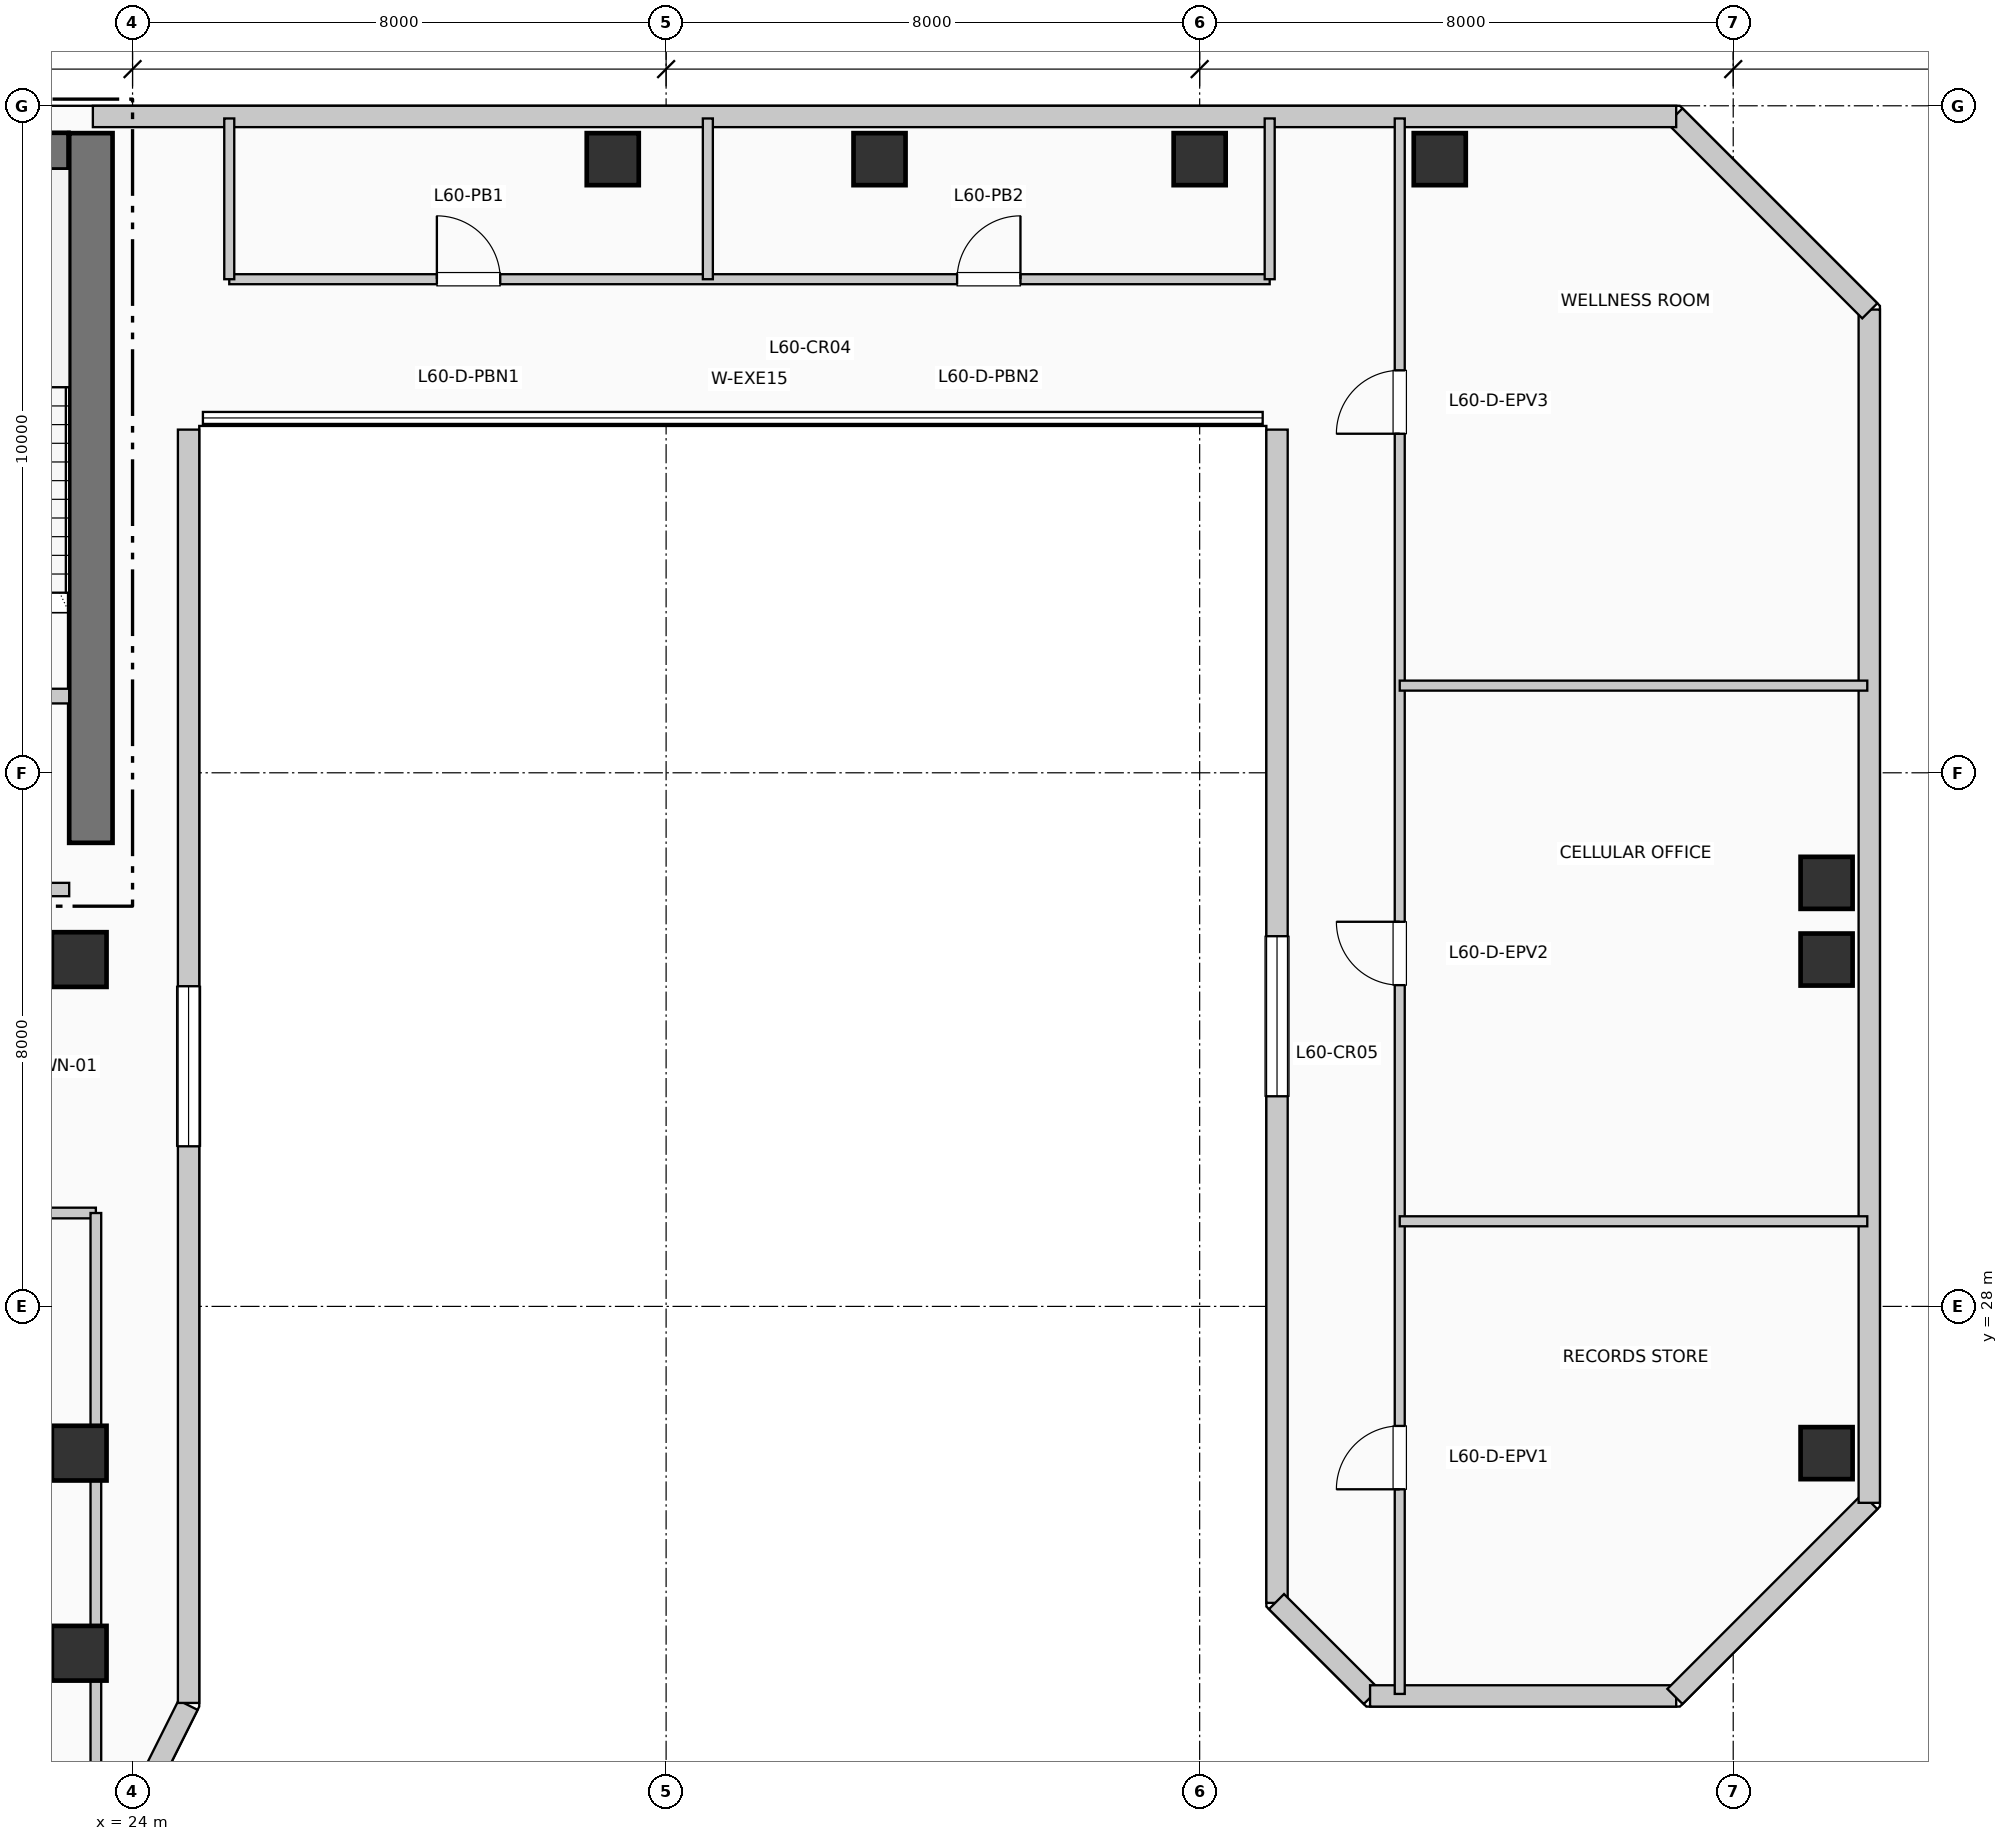
"""IFC4 building model, lengths in metres.
Left out: names, types, materials, properties, quantities, classifications, styles, units other than length and angle.
Written with IfcOpenShell. Run it as: python <this file> out.ifc"""

import sys

from ifc_helpers import new_model, si_unit, direction, frame, frame_2d, origin, origin_2d, place, context, subcontext, project, spatial, rectangle, extrude, element, fill, save


model = new_model("IFC4")
c1 = context("Model", 3, precision=1e-05, world=origin(), true_north=direction((0.0, 1.0)))
c2 = subcontext(c1, "Body", "Model", "MODEL_VIEW")
j1 = project(units=[si_unit("LENGTHUNIT", "METRE"), si_unit("PLANEANGLEUNIT", "RADIAN")], contexts=[c1])
p1 = place(None, origin())
s1 = spatial("IfcSite", under=j1, at=p1, CompositionType="ELEMENT")
p2 = place(p1, origin())
s2 = spatial("IfcBuilding", under=s1, at=p2, CompositionType="ELEMENT")
p3 = place(p2, frame((0.0, 0.0, 247.5)))
s3 = spatial("IfcBuildingStorey", under=s2, at=p3, CompositionType="ELEMENT", Elevation=247.5)
p4 = place(p3, frame((23.375, 34.95, 0.0), z_axis=(0.0, 0.0, 1.0), x_axis=(0.0, 1.0, 0.0)))
e1 = element("IfcWall", 1, at=p4, inside=s3, PredefinedType="SHEAR", context=c2, shape_type="SweptSolid", body=[
    extrude(rectangle(XDim=10.64, YDim=0.65, at=frame_2d((5.32, 0.0))), origin(), (0.0, 0.0, 1.0), 3.96),
])
p5 = place(p3, frame((19.35, 45.32, 0.0), z_axis=(0.0, 0.0, 1.0), x_axis=(1.0, 0.0, 0.0)))
e2 = element("IfcWall", 2, at=p5, inside=s3, PredefinedType="SHEAR", context=c2, shape_type="SweptSolid", body=[
    extrude(rectangle(XDim=3.69, YDim=0.55, at=frame_2d((1.845, 0.0))), origin(), (0.0, 0.0, 1.0), 3.96),
])
p6 = place(p5, frame((1.15, 0.0, 1.05)))
e3 = element("IfcOpeningElement", 3, at=p6, cuts=e2, PredefinedType="OPENING", context=c2, shape_type="SweptSolid", body=[
    extrude(rectangle(XDim=1.4, YDim=1.8, at=frame_2d((0.7, 0.9))), frame((0.0, 0.285, 0.0), z_axis=(0.0, -1.0, 0.0), x_axis=(1.0, 0.0, 0.0)), (0.0, 0.0, 1.0), 0.57),
])
for number, where, z_axis, x_axis in (
    (4, (23.2, 22.8, 0.0), (0.0, 0.0, 1.0), (1.0, 0.0, 0.0)),
    (5, (23.2, 25.8, 0.0), (0.0, 0.0, 1.0), (1.0, 0.0, 0.0)),
    (6, (23.2, 33.2, 0.0), (0.0, 0.0, 1.0), (1.0, 0.0, 0.0)),
):
    element("IfcColumn", number, at=place(p3, frame(where, z_axis=z_axis, x_axis=x_axis)), inside=s3, PredefinedType="COLUMN", context=c2, shape_type="SweptSolid", body=[
        extrude(rectangle(XDim=0.82, YDim=0.82, at=origin_2d()), origin(), (0.0, 0.0, 1.0), 3.96),
    ])
for number, where, z_axis, x_axis in (
    (7, (31.2, 45.2, 0.0), (0.0, 0.0, 1.0), (1.0, 0.0, 0.0)),
    (8, (35.2, 45.2, 0.0), (0.0, 0.0, 1.0), (1.0, 0.0, 0.0)),
    (9, (40.0, 45.2, 0.0), (0.0, 0.0, 1.0), (1.0, 0.0, 0.0)),
    (10, (43.6, 45.2, 0.0), (0.0, 0.0, 1.0), (1.0, 0.0, 0.0)),
    (11, (49.4, 25.8, 0.0), (0.0, 0.0, 1.0), (1.0, 0.0, 0.0)),
    (12, (49.4, 33.2, 0.0), (0.0, 0.0, 1.0), (1.0, 0.0, 0.0)),
    (13, (49.4, 34.35, 0.0), (0.0, 0.0, 1.0), (1.0, 0.0, 0.0)),
):
    element("IfcColumn", number, at=place(p3, frame(where, z_axis=z_axis, x_axis=x_axis)), inside=s3, PredefinedType="COLUMN", context=c2, shape_type="SweptSolid", body=[
        extrude(rectangle(XDim=0.78, YDim=0.78, at=origin_2d()), origin(), (0.0, 0.0, 1.0), 3.96),
    ])
p7 = place(p3, frame((23.882, 20.121, 0.0), z_axis=(0.0, 0.0, 1.0), x_axis=(0.447121734542, 0.894473115583, 0.0)))
e14 = element("IfcWall", 14, at=p7, inside=s3, PredefinedType="SOLIDWALL", context=c2, shape_type="SweptSolid", body=[
    extrude(rectangle(XDim=2.126, YDim=0.32, at=frame_2d((1.063, 0.0))), origin(), (0.0, 0.0, 1.0), 3.54),
])
p8 = place(p3, frame((24.84, 22.055, 0.0), z_axis=(0.0, 0.0, 1.0), x_axis=(0.0, 1.0, 0.0)))
e15 = element("IfcWall", 15, at=p8, inside=s3, PredefinedType="SOLIDWALL", context=c2, shape_type="SweptSolid", body=[
    extrude(rectangle(XDim=19.09, YDim=0.32, at=frame_2d((9.545, 0.0))), origin(), (0.0, 0.0, 1.0), 3.54),
])
p9 = place(p8, frame((8.345, 0.0, 0.85)))
e16 = element("IfcOpeningElement", 16, at=p9, cuts=e15, PredefinedType="OPENING", context=c2, shape_type="SweptSolid", body=[
    extrude(rectangle(XDim=2.4, YDim=2.05, at=frame_2d((1.2, 1.025))), frame((0.0, 0.17, 0.0), z_axis=(0.0, -1.0, 0.0), x_axis=(1.0, 0.0, 0.0)), (0.0, 0.0, 1.0), 0.34),
])
p10 = place(p3, frame((41.16, 41.145, 0.0), z_axis=(0.0, 0.0, 1.0), x_axis=(0.0, -1.0, 0.0)))
e17 = element("IfcWall", 17, at=p10, inside=s3, PredefinedType="SOLIDWALL", context=c2, shape_type="SweptSolid", body=[
    extrude(rectangle(XDim=17.59, YDim=0.32, at=frame_2d((8.795, 0.0))), origin(), (0.0, 0.0, 1.0), 3.54),
])
p11 = place(p10, frame((7.595, 0.0, 0.85)))
e18 = element("IfcOpeningElement", 18, at=p11, cuts=e17, PredefinedType="OPENING", context=c2, shape_type="SweptSolid", body=[
    extrude(rectangle(XDim=2.4, YDim=2.05, at=frame_2d((1.2, 1.025))), frame((0.0, 0.17, 0.0), z_axis=(0.0, -1.0, 0.0), x_axis=(1.0, 0.0, 0.0)), (0.0, 0.0, 1.0), 0.34),
])
p12 = place(p3, frame((41.152, 23.574, 0.0), z_axis=(0.0, 0.0, 1.0), x_axis=(0.707106781187, -0.707106781187, 0.0)))
e19 = element("IfcWall", 19, at=p12, inside=s3, PredefinedType="SOLIDWALL", context=c2, shape_type="SweptSolid", body=[
    extrude(rectangle(XDim=2.011, YDim=0.32, at=frame_2d((1.006, 0.0))), origin(), (0.0, 0.0, 1.0), 3.54),
])
p13 = place(p3, frame((42.555, 22.16, 0.0), z_axis=(0.0, 0.0, 1.0), x_axis=(1.0, 0.0, 0.0)))
e20 = element("IfcWall", 20, at=p13, inside=s3, PredefinedType="SOLIDWALL", context=c2, shape_type="SweptSolid", body=[
    extrude(rectangle(XDim=4.59, YDim=0.32, at=frame_2d((2.295, 0.0))), origin(), (0.0, 0.0, 1.0), 3.54),
])
p14 = place(p3, frame((47.126, 22.152, 0.0), z_axis=(0.0, 0.0, 1.0), x_axis=(0.707136318428, 0.707077242712, 0.0)))
e21 = element("IfcWall", 21, at=p14, inside=s3, PredefinedType="SOLIDWALL", context=c2, shape_type="SweptSolid", body=[
    extrude(rectangle(XDim=4.133, YDim=0.32, at=frame_2d((2.066, 0.0))), origin(), (0.0, 0.0, 1.0), 3.54),
])
p15 = place(p3, frame((50.04, 25.055, 0.0), z_axis=(0.0, 0.0, 1.0), x_axis=(0.0, 1.0, 0.0)))
e22 = element("IfcWall", 22, at=p15, inside=s3, PredefinedType="SOLIDWALL", context=c2, shape_type="SweptSolid", body=[
    extrude(rectangle(XDim=17.89, YDim=0.32, at=frame_2d((8.945, 0.0))), origin(), (0.0, 0.0, 1.0), 3.54),
])
p16 = place(p3, frame((50.048, 42.926, 0.0), z_axis=(0.0, 0.0, 1.0), x_axis=(-0.707136318428, 0.707077242712, 0.0)))
e23 = element("IfcWall", 23, at=p16, inside=s3, PredefinedType="SOLIDWALL", context=c2, shape_type="SweptSolid", body=[
    extrude(rectangle(XDim=4.133, YDim=0.32, at=frame_2d((2.066, 0.0))), origin(), (0.0, 0.0, 1.0), 3.54),
])
p17 = place(p3, frame((47.145, 45.84, 0.0), z_axis=(0.0, 0.0, 1.0), x_axis=(-1.0, 0.0, 0.0)))
e24 = element("IfcWall", 24, at=p17, inside=s3, PredefinedType="SOLIDWALL", context=c2, shape_type="SweptSolid", body=[
    extrude(rectangle(XDim=23.74, YDim=0.32, at=frame_2d((11.87, 0.0))), origin(), (0.0, 0.0, 1.0), 3.54),
])
p18 = place(p3, frame((19.9, 37.15, 0.0), z_axis=(0.0, 0.0, 1.0), x_axis=(1.0, 0.0, 0.0)))
e25 = element("IfcWall", 25, at=p18, inside=s3, PredefinedType="PARTITIONING", context=c2, shape_type="SweptSolid", body=[
    extrude(rectangle(XDim=3.15, YDim=0.22, at=frame_2d((1.575, 0.0))), origin(), (0.0, 0.0, 1.0), 3.54),
])
p19 = place(p18, frame((2.05, 0.0, 0.0), z_axis=(0.0, 0.0, 1.0), x_axis=(-1.0, 0.0, 0.0)))
e26 = element("IfcOpeningElement", 26, at=p19, cuts=e25, PredefinedType="OPENING", context=c2, shape_type="SweptSolid", body=[
    extrude(rectangle(XDim=1.05, YDim=2.15, at=frame_2d((0.525, 1.075))), frame((0.0, 0.12, 0.0), z_axis=(0.0, -1.0, 0.0), x_axis=(1.0, 0.0, 0.0)), (0.0, 0.0, 1.0), 0.24),
])
p20 = place(p3, frame((19.8, 34.25, 0.0), z_axis=(0.0, 0.0, 1.0), x_axis=(1.0, 0.0, 0.0)))
e27 = element("IfcWall", 27, at=p20, inside=s3, PredefinedType="PARTITIONING", context=c2, shape_type="SweptSolid", body=[
    extrude(rectangle(XDim=3.25, YDim=0.2, at=frame_2d((1.625, 0.0))), origin(), (0.0, 0.0, 1.0), 3.54),
])
p21 = place(p20, frame((2.15, 0.0, 0.0), z_axis=(0.0, 0.0, 1.0), x_axis=(-1.0, 0.0, 0.0)))
e28 = element("IfcOpeningElement", 28, at=p21, cuts=e27, PredefinedType="OPENING", context=c2, shape_type="SweptSolid", body=[
    extrude(rectangle(XDim=1.1, YDim=2.15, at=frame_2d((0.55, 1.075))), frame((0.0, 0.11, 0.0), z_axis=(0.0, -1.0, 0.0), x_axis=(1.0, 0.0, 0.0)), (0.0, 0.0, 1.0), 0.22),
])
p22 = place(p3, frame((9.04, 29.4, 0.0), z_axis=(0.0, 0.0, 1.0), x_axis=(1.0, 0.0, 0.0)))
e29 = element("IfcWall", 29, at=p22, inside=s3, PredefinedType="PARTITIONING", context=c2, shape_type="SweptSolid", body=[
    extrude(rectangle(XDim=14.41, YDim=0.16, at=frame_2d((7.205, 0.0))), origin(), (0.0, 0.0, 1.0), 3.195),
])
p23 = place(p3, frame((23.45, 5.99, 0.0), z_axis=(0.0, 0.0, 1.0), x_axis=(0.0, 1.0, 0.0)))
e30 = element("IfcWall", 30, at=p23, inside=s3, PredefinedType="PARTITIONING", context=c2, shape_type="SweptSolid", body=[
    extrude(rectangle(XDim=23.41, YDim=0.16, at=frame_2d((11.705, 0.0))), origin(), (0.0, 0.0, 1.0), 2.925),
])
p24 = place(p3, frame((9.04, 22.992, 0.0), z_axis=(0.0, 0.0, 1.0), x_axis=(1.0, 0.0, 0.0)))
e31 = element("IfcWall", 31, at=p24, inside=s3, PredefinedType="PARTITIONING", context=c2, shape_type="SweptSolid", body=[
    extrude(rectangle(XDim=14.41, YDim=0.13, at=frame_2d((7.205, 0.0))), origin(), (0.0, 0.0, 1.0), 2.925),
])
p25 = place(p3, frame((25.45, 43.4, 0.0), z_axis=(0.0, 0.0, 1.0), x_axis=(1.0, 0.0, 0.0)))
e32 = element("IfcWall", 32, at=p25, inside=s3, PredefinedType="PARTITIONING", context=c2, shape_type="SweptSolid", body=[
    extrude(rectangle(XDim=15.6, YDim=0.15, at=frame_2d((7.8, 0.0))), origin(), (0.0, 0.0, 1.0), 3.54),
])
p26 = place(p25, frame((3.113, 0.0, 0.0)))
e33 = element("IfcOpeningElement", 33, at=p26, cuts=e32, PredefinedType="OPENING", context=c2, shape_type="SweptSolid", body=[
    extrude(rectangle(XDim=0.95, YDim=2.15, at=frame_2d((0.475, 1.075))), frame((0.0, 0.085, 0.0), z_axis=(0.0, -1.0, 0.0), x_axis=(1.0, 0.0, 0.0)), (0.0, 0.0, 1.0), 0.17),
])
p27 = place(p25, frame((10.913, 0.0, 0.0)))
e34 = element("IfcOpeningElement", 34, at=p27, cuts=e32, PredefinedType="OPENING", context=c2, shape_type="SweptSolid", body=[
    extrude(rectangle(XDim=0.95, YDim=2.15, at=frame_2d((0.475, 1.075))), frame((0.0, 0.085, 0.0), z_axis=(0.0, -1.0, 0.0), x_axis=(1.0, 0.0, 0.0)), (0.0, 0.0, 1.0), 0.17),
])
for number, where, z_axis, x_axis in (
    (35, (25.45, 43.4, 0.0), (0.0, 0.0, 1.0), (0.0, 1.0, 0.0)),
    (36, (41.05, 43.4, 0.0), (0.0, 0.0, 1.0), (0.0, 1.0, 0.0)),
    (37, (32.626, 43.4, 0.0), (0.0, 0.0, 1.0), (0.0, 1.0, 0.0)),
):
    element("IfcWall", number, at=place(p3, frame(where, z_axis=z_axis, x_axis=x_axis)), inside=s3, PredefinedType="PARTITIONING", context=c2, shape_type="SweptSolid", body=[
        extrude(rectangle(XDim=2.41, YDim=0.15, at=frame_2d((1.205, 0.0))), origin(), (0.0, 0.0, 1.0), 3.54),
    ])
p28 = place(p3, frame((43.0, 22.19, 0.0), z_axis=(0.0, 0.0, 1.0), x_axis=(0.0, 1.0, 0.0)))
e38 = element("IfcWall", 38, at=p28, inside=s3, PredefinedType="PARTITIONING", context=c2, shape_type="SweptSolid", body=[
    extrude(rectangle(XDim=23.62, YDim=0.15, at=frame_2d((11.81, 0.0))), origin(), (0.0, 0.0, 1.0), 3.54),
])
p29 = place(p28, frame((3.068, 0.0, 0.0)))
e39 = element("IfcOpeningElement", 39, at=p29, cuts=e38, PredefinedType="OPENING", context=c2, shape_type="SweptSolid", body=[
    extrude(rectangle(XDim=0.95, YDim=2.15, at=frame_2d((0.475, 1.075))), frame((0.0, 0.085, 0.0), z_axis=(0.0, -1.0, 0.0), x_axis=(1.0, 0.0, 0.0)), (0.0, 0.0, 1.0), 0.17),
])
p30 = place(p28, frame((10.626, 0.0, 0.0)))
e40 = element("IfcOpeningElement", 40, at=p30, cuts=e38, PredefinedType="OPENING", context=c2, shape_type="SweptSolid", body=[
    extrude(rectangle(XDim=0.95, YDim=2.15, at=frame_2d((0.475, 1.075))), frame((0.0, 0.085, 0.0), z_axis=(0.0, -1.0, 0.0), x_axis=(1.0, 0.0, 0.0)), (0.0, 0.0, 1.0), 0.17),
])
p31 = place(p28, frame((18.893, 0.0, 0.0)))
e41 = element("IfcOpeningElement", 41, at=p31, cuts=e38, PredefinedType="OPENING", context=c2, shape_type="SweptSolid", body=[
    extrude(rectangle(XDim=0.95, YDim=2.15, at=frame_2d((0.475, 1.075))), frame((0.0, 0.085, 0.0), z_axis=(0.0, -1.0, 0.0), x_axis=(1.0, 0.0, 0.0)), (0.0, 0.0, 1.0), 0.17),
])
for number, where, z_axis, x_axis in (
    (42, (43.0, 29.276, 0.0), (0.0, 0.0, 1.0), (1.0, 0.0, 0.0)),
    (43, (43.0, 37.307, 0.0), (0.0, 0.0, 1.0), (1.0, 0.0, 0.0)),
):
    element("IfcWall", number, at=place(p3, frame(where, z_axis=z_axis, x_axis=x_axis)), inside=s3, PredefinedType="PARTITIONING", context=c2, shape_type="SweptSolid", body=[
        extrude(rectangle(XDim=7.01, YDim=0.15, at=frame_2d((3.505, 0.0))), origin(), (0.0, 0.0, 1.0), 3.54),
    ])
p32 = place(p9, origin())
e44 = element("IfcWindow", 44, at=p32, inside=s3, PartitioningType="SINGLE_PANEL", PredefinedType="WINDOW", context=c2, shape_type="SweptSolid", body=[
    extrude(rectangle(XDim=2.4, YDim=2.05, at=frame_2d((1.2, 1.025))), frame((0.0, 0.03, 0.0), z_axis=(0.0, -1.0, 0.0), x_axis=(1.0, 0.0, 0.0)), (0.0, 0.0, 1.0), 0.06),
])
fill(e16, e44)
p33 = place(p11, origin())
e45 = element("IfcWindow", 45, at=p33, inside=s3, PartitioningType="SINGLE_PANEL", PredefinedType="WINDOW", context=c2, shape_type="SweptSolid", body=[
    extrude(rectangle(XDim=2.4, YDim=2.05, at=frame_2d((1.2, 1.025))), frame((0.0, 0.03, 0.0), z_axis=(0.0, -1.0, 0.0), x_axis=(1.0, 0.0, 0.0)), (0.0, 0.0, 1.0), 0.06),
])
fill(e18, e45)
p34 = place(p26, origin())
e46 = element("IfcDoor", 46, at=p34, inside=s3, OperationType="SINGLE_SWING_LEFT", PredefinedType="DOOR", context=c2, shape_type="SweptSolid", body=[
    extrude(rectangle(XDim=0.95, YDim=2.15, at=frame_2d((0.475, 1.075))), frame((0.0, 0.025, 0.0), z_axis=(0.0, -1.0, 0.0), x_axis=(1.0, 0.0, 0.0)), (0.0, 0.0, 1.0), 0.05),
])
fill(e33, e46)
p35 = place(p27, origin())
e47 = element("IfcDoor", 47, at=p35, inside=s3, OperationType="SINGLE_SWING_RIGHT", PredefinedType="DOOR", context=c2, shape_type="SweptSolid", body=[
    extrude(rectangle(XDim=0.95, YDim=2.15, at=frame_2d((0.475, 1.075))), frame((0.0, 0.025, 0.0), z_axis=(0.0, -1.0, 0.0), x_axis=(1.0, 0.0, 0.0)), (0.0, 0.0, 1.0), 0.05),
])
fill(e34, e47)
p36 = place(p29, origin())
e48 = element("IfcDoor", 48, at=p36, inside=s3, OperationType="SINGLE_SWING_LEFT", PredefinedType="DOOR", context=c2, shape_type="SweptSolid", body=[
    extrude(rectangle(XDim=0.95, YDim=2.15, at=frame_2d((0.475, 1.075))), frame((0.0, 0.025, 0.0), z_axis=(0.0, -1.0, 0.0), x_axis=(1.0, 0.0, 0.0)), (0.0, 0.0, 1.0), 0.05),
])
fill(e39, e48)
p37 = place(p30, origin())
e49 = element("IfcDoor", 49, at=p37, inside=s3, OperationType="SINGLE_SWING_RIGHT", PredefinedType="DOOR", context=c2, shape_type="SweptSolid", body=[
    extrude(rectangle(XDim=0.95, YDim=2.15, at=frame_2d((0.475, 1.075))), frame((0.0, 0.025, 0.0), z_axis=(0.0, -1.0, 0.0), x_axis=(1.0, 0.0, 0.0)), (0.0, 0.0, 1.0), 0.05),
])
fill(e40, e49)
p38 = place(p31, origin())
e50 = element("IfcDoor", 50, at=p38, inside=s3, OperationType="SINGLE_SWING_LEFT", PredefinedType="DOOR", context=c2, shape_type="SweptSolid", body=[
    extrude(rectangle(XDim=0.95, YDim=2.15, at=frame_2d((0.475, 1.075))), frame((0.0, 0.025, 0.0), z_axis=(0.0, -1.0, 0.0), x_axis=(1.0, 0.0, 0.0)), (0.0, 0.0, 1.0), 0.05),
])
fill(e41, e50)
save(model, sys.argv[1])
